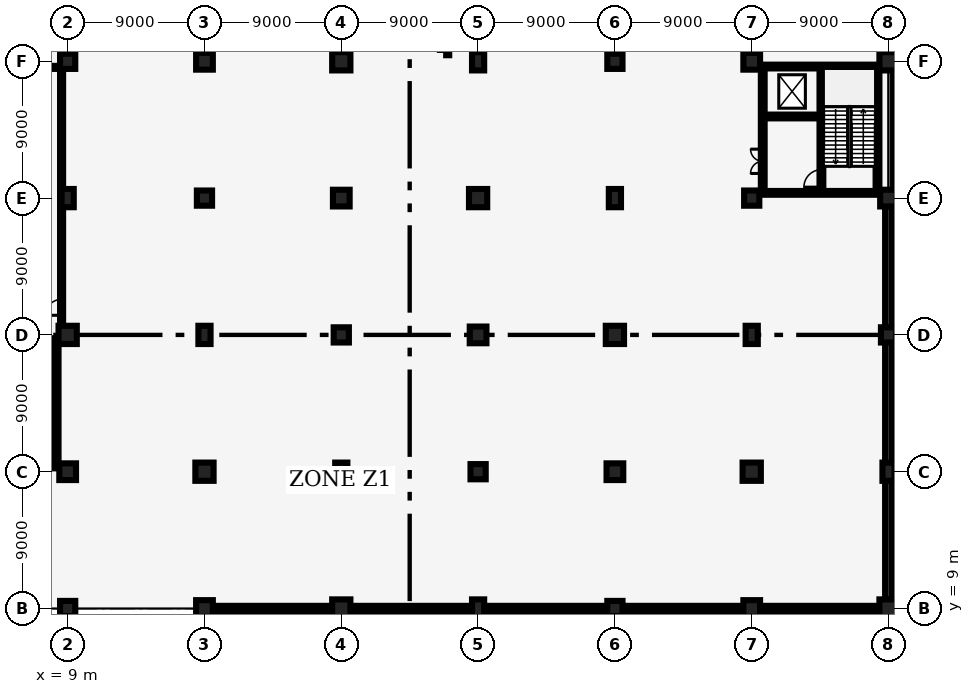
"""IFC4 building model, lengths in metres.
Left out: names, types, materials, properties, quantities, classifications, styles, units other than length and angle.
Written with IfcOpenShell. Run it as: python <this file> out.ifc"""

import sys

from ifc_helpers import new_model, si_unit, direction, frame, frame_2d, origin, origin_2d, place, context, subcontext, project, spatial, rectangle, extrude, element, fill, save


model = new_model("IFC4")
c1 = context("Model", 3, precision=1e-05, world=origin(), true_north=direction((0.0, 1.0)))
c2 = subcontext(c1, "Body", "Model", "MODEL_VIEW")
j1 = project(units=[si_unit("LENGTHUNIT", "METRE"), si_unit("PLANEANGLEUNIT", "RADIAN")], contexts=[c1])
p1 = place(None, origin())
s1 = spatial("IfcSite", under=j1, at=p1, CompositionType="ELEMENT")
p2 = place(p1, origin())
s2 = spatial("IfcBuilding", under=s1, at=p2, CompositionType="ELEMENT")
p3 = place(p2, frame((0.0, 0.0, -5.0)))
s3 = spatial("IfcBuildingStorey", under=s2, at=p3, CompositionType="ELEMENT", Elevation=-5.0)
p4 = place(p3, frame((9.0, 9.0, 0.0), z_axis=(0.0, 0.0, 1.0), x_axis=(1.0, 0.0, 0.0)))
e1 = element("IfcColumn", 1, at=p4, inside=s3, PredefinedType="COLUMN", context=c2, shape_type="SweptSolid", body=[
    extrude(rectangle(XDim=1.0, YDim=1.0, at=origin_2d()), origin(), (0.0, 0.0, 1.0), 5.0),
])
p5 = place(p3, frame((9.0, 18.0, 0.0), z_axis=(0.0, 0.0, 1.0), x_axis=(1.0, 0.0, 0.0)))
e2 = element("IfcColumn", 2, at=p5, inside=s3, PredefinedType="COLUMN", context=c2, shape_type="SweptSolid", body=[
    extrude(rectangle(XDim=1.1, YDim=1.1, at=origin_2d()), origin(), (0.0, 0.0, 1.0), 5.0),
])
p6 = place(p3, frame((9.0, 27.0, 0.0), z_axis=(0.0, 0.0, 1.0), x_axis=(1.0, 0.0, 0.0)))
e3 = element("IfcColumn", 3, at=p6, inside=s3, PredefinedType="COLUMN", context=c2, shape_type="SweptSolid", body=[
    extrude(rectangle(XDim=1.2, YDim=1.2, at=origin_2d()), origin(), (0.0, 0.0, 1.0), 5.0),
])
p7 = place(p3, frame((9.0, 36.0, 0.0), z_axis=(0.0, 0.0, 1.0), x_axis=(1.0, 0.0, 0.0)))
e4 = element("IfcColumn", 4, at=p7, inside=s3, PredefinedType="COLUMN", context=c2, shape_type="SweptSolid", body=[
    extrude(rectangle(XDim=0.8, YDim=1.2, at=origin_2d()), origin(), (0.0, 0.0, 1.0), 5.0),
])
p8 = place(p3, frame((9.0, 45.0, 0.0), z_axis=(0.0, 0.0, 1.0), x_axis=(1.0, 0.0, 0.0)))
e5 = element("IfcColumn", 5, at=p8, inside=s3, PredefinedType="COLUMN", context=c2, shape_type="SweptSolid", body=[
    extrude(rectangle(XDim=1.0, YDim=1.0, at=origin_2d()), origin(), (0.0, 0.0, 1.0), 5.0),
])
p9 = place(p3, frame((18.0, 9.0, 0.0), z_axis=(0.0, 0.0, 1.0), x_axis=(1.0, 0.0, 0.0)))
e6 = element("IfcColumn", 6, at=p9, inside=s3, PredefinedType="COLUMN", context=c2, shape_type="SweptSolid", body=[
    extrude(rectangle(XDim=1.1, YDim=1.1, at=origin_2d()), origin(), (0.0, 0.0, 1.0), 5.0),
])
p10 = place(p3, frame((18.0, 18.0, 0.0), z_axis=(0.0, 0.0, 1.0), x_axis=(1.0, 0.0, 0.0)))
e7 = element("IfcColumn", 7, at=p10, inside=s3, PredefinedType="COLUMN", context=c2, shape_type="SweptSolid", body=[
    extrude(rectangle(XDim=1.2, YDim=1.2, at=origin_2d()), origin(), (0.0, 0.0, 1.0), 5.0),
])
p11 = place(p3, frame((18.0, 27.0, 0.0), z_axis=(0.0, 0.0, 1.0), x_axis=(1.0, 0.0, 0.0)))
e8 = element("IfcColumn", 8, at=p11, inside=s3, PredefinedType="COLUMN", context=c2, shape_type="SweptSolid", body=[
    extrude(rectangle(XDim=0.8, YDim=1.2, at=origin_2d()), origin(), (0.0, 0.0, 1.0), 5.0),
])
p12 = place(p3, frame((18.0, 36.0, 0.0), z_axis=(0.0, 0.0, 1.0), x_axis=(1.0, 0.0, 0.0)))
e9 = element("IfcColumn", 9, at=p12, inside=s3, PredefinedType="COLUMN", context=c2, shape_type="SweptSolid", body=[
    extrude(rectangle(XDim=1.0, YDim=1.0, at=origin_2d()), origin(), (0.0, 0.0, 1.0), 5.0),
])
p13 = place(p3, frame((18.0, 45.0, 0.0), z_axis=(0.0, 0.0, 1.0), x_axis=(1.0, 0.0, 0.0)))
e10 = element("IfcColumn", 10, at=p13, inside=s3, PredefinedType="COLUMN", context=c2, shape_type="SweptSolid", body=[
    extrude(rectangle(XDim=1.1, YDim=1.1, at=origin_2d()), origin(), (0.0, 0.0, 1.0), 5.0),
])
p14 = place(p3, frame((27.0, 9.0, 0.0), z_axis=(0.0, 0.0, 1.0), x_axis=(1.0, 0.0, 0.0)))
e11 = element("IfcColumn", 11, at=p14, inside=s3, PredefinedType="COLUMN", context=c2, shape_type="SweptSolid", body=[
    extrude(rectangle(XDim=1.2, YDim=1.2, at=origin_2d()), origin(), (0.0, 0.0, 1.0), 5.0),
])
p15 = place(p3, frame((27.0, 18.0, 0.0), z_axis=(0.0, 0.0, 1.0), x_axis=(1.0, 0.0, 0.0)))
e12 = element("IfcColumn", 12, at=p15, inside=s3, PredefinedType="COLUMN", context=c2, shape_type="SweptSolid", body=[
    extrude(rectangle(XDim=0.8, YDim=1.2, at=origin_2d()), origin(), (0.0, 0.0, 1.0), 5.0),
])
p16 = place(p3, frame((27.0, 27.0, 0.0), z_axis=(0.0, 0.0, 1.0), x_axis=(1.0, 0.0, 0.0)))
e13 = element("IfcColumn", 13, at=p16, inside=s3, PredefinedType="COLUMN", context=c2, shape_type="SweptSolid", body=[
    extrude(rectangle(XDim=1.0, YDim=1.0, at=origin_2d()), origin(), (0.0, 0.0, 1.0), 4.66),
])
p17 = place(p3, frame((27.0, 36.0, 0.0), z_axis=(0.0, 0.0, 1.0), x_axis=(1.0, 0.0, 0.0)))
e14 = element("IfcColumn", 14, at=p17, inside=s3, PredefinedType="COLUMN", context=c2, shape_type="SweptSolid", body=[
    extrude(rectangle(XDim=1.1, YDim=1.1, at=origin_2d()), origin(), (0.0, 0.0, 1.0), 4.66),
])
p18 = place(p3, frame((27.0, 45.0, 0.0), z_axis=(0.0, 0.0, 1.0), x_axis=(1.0, 0.0, 0.0)))
e15 = element("IfcColumn", 15, at=p18, inside=s3, PredefinedType="COLUMN", context=c2, shape_type="SweptSolid", body=[
    extrude(rectangle(XDim=1.2, YDim=1.2, at=origin_2d()), origin(), (0.0, 0.0, 1.0), 5.0),
])
p19 = place(p3, frame((36.0, 9.0, 0.0), z_axis=(0.0, 0.0, 1.0), x_axis=(1.0, 0.0, 0.0)))
e16 = element("IfcColumn", 16, at=p19, inside=s3, PredefinedType="COLUMN", context=c2, shape_type="SweptSolid", body=[
    extrude(rectangle(XDim=0.8, YDim=1.2, at=origin_2d()), origin(), (0.0, 0.0, 1.0), 5.0),
])
p20 = place(p3, frame((36.0, 18.0, 0.0), z_axis=(0.0, 0.0, 1.0), x_axis=(1.0, 0.0, 0.0)))
e17 = element("IfcColumn", 17, at=p20, inside=s3, PredefinedType="COLUMN", context=c2, shape_type="SweptSolid", body=[
    extrude(rectangle(XDim=1.0, YDim=1.0, at=origin_2d()), origin(), (0.0, 0.0, 1.0), 5.0),
])
p21 = place(p3, frame((36.0, 27.0, 0.0), z_axis=(0.0, 0.0, 1.0), x_axis=(1.0, 0.0, 0.0)))
e18 = element("IfcColumn", 18, at=p21, inside=s3, PredefinedType="COLUMN", context=c2, shape_type="SweptSolid", body=[
    extrude(rectangle(XDim=1.1, YDim=1.1, at=origin_2d()), origin(), (0.0, 0.0, 1.0), 4.66),
])
p22 = place(p3, frame((36.0, 36.0, 0.0), z_axis=(0.0, 0.0, 1.0), x_axis=(1.0, 0.0, 0.0)))
e19 = element("IfcColumn", 19, at=p22, inside=s3, PredefinedType="COLUMN", context=c2, shape_type="SweptSolid", body=[
    extrude(rectangle(XDim=1.2, YDim=1.2, at=origin_2d()), origin(), (0.0, 0.0, 1.0), 4.66),
])
p23 = place(p3, frame((36.0, 45.0, 0.0), z_axis=(0.0, 0.0, 1.0), x_axis=(1.0, 0.0, 0.0)))
e20 = element("IfcColumn", 20, at=p23, inside=s3, PredefinedType="COLUMN", context=c2, shape_type="SweptSolid", body=[
    extrude(rectangle(XDim=0.8, YDim=1.2, at=origin_2d()), origin(), (0.0, 0.0, 1.0), 5.0),
])
p24 = place(p3, frame((45.0, 9.0, 0.0), z_axis=(0.0, 0.0, 1.0), x_axis=(1.0, 0.0, 0.0)))
e21 = element("IfcColumn", 21, at=p24, inside=s3, PredefinedType="COLUMN", context=c2, shape_type="SweptSolid", body=[
    extrude(rectangle(XDim=1.0, YDim=1.0, at=origin_2d()), origin(), (0.0, 0.0, 1.0), 5.0),
])
p25 = place(p3, frame((45.0, 18.0, 0.0), z_axis=(0.0, 0.0, 1.0), x_axis=(1.0, 0.0, 0.0)))
e22 = element("IfcColumn", 22, at=p25, inside=s3, PredefinedType="COLUMN", context=c2, shape_type="SweptSolid", body=[
    extrude(rectangle(XDim=1.1, YDim=1.1, at=origin_2d()), origin(), (0.0, 0.0, 1.0), 5.0),
])
p26 = place(p3, frame((45.0, 27.0, 0.0), z_axis=(0.0, 0.0, 1.0), x_axis=(1.0, 0.0, 0.0)))
e23 = element("IfcColumn", 23, at=p26, inside=s3, PredefinedType="COLUMN", context=c2, shape_type="SweptSolid", body=[
    extrude(rectangle(XDim=1.2, YDim=1.2, at=origin_2d()), origin(), (0.0, 0.0, 1.0), 4.66),
])
p27 = place(p3, frame((45.0, 36.0, 0.0), z_axis=(0.0, 0.0, 1.0), x_axis=(1.0, 0.0, 0.0)))
e24 = element("IfcColumn", 24, at=p27, inside=s3, PredefinedType="COLUMN", context=c2, shape_type="SweptSolid", body=[
    extrude(rectangle(XDim=0.8, YDim=1.2, at=origin_2d()), origin(), (0.0, 0.0, 1.0), 4.66),
])
p28 = place(p3, frame((45.0, 45.0, 0.0), z_axis=(0.0, 0.0, 1.0), x_axis=(1.0, 0.0, 0.0)))
e25 = element("IfcColumn", 25, at=p28, inside=s3, PredefinedType="COLUMN", context=c2, shape_type="SweptSolid", body=[
    extrude(rectangle(XDim=1.0, YDim=1.0, at=origin_2d()), origin(), (0.0, 0.0, 1.0), 5.0),
])
p29 = place(p3, frame((54.0, 9.0, 0.0), z_axis=(0.0, 0.0, 1.0), x_axis=(1.0, 0.0, 0.0)))
e26 = element("IfcColumn", 26, at=p29, inside=s3, PredefinedType="COLUMN", context=c2, shape_type="SweptSolid", body=[
    extrude(rectangle(XDim=1.1, YDim=1.1, at=origin_2d()), origin(), (0.0, 0.0, 1.0), 5.0),
])
p30 = place(p3, frame((54.0, 18.0, 0.0), z_axis=(0.0, 0.0, 1.0), x_axis=(1.0, 0.0, 0.0)))
e27 = element("IfcColumn", 27, at=p30, inside=s3, PredefinedType="COLUMN", context=c2, shape_type="SweptSolid", body=[
    extrude(rectangle(XDim=1.2, YDim=1.2, at=origin_2d()), origin(), (0.0, 0.0, 1.0), 5.0),
])
p31 = place(p3, frame((54.0, 27.0, 0.0), z_axis=(0.0, 0.0, 1.0), x_axis=(1.0, 0.0, 0.0)))
e28 = element("IfcColumn", 28, at=p31, inside=s3, PredefinedType="COLUMN", context=c2, shape_type="SweptSolid", body=[
    extrude(rectangle(XDim=0.8, YDim=1.2, at=origin_2d()), origin(), (0.0, 0.0, 1.0), 5.0),
])
p32 = place(p3, frame((54.0, 36.0, 0.0), z_axis=(0.0, 0.0, 1.0), x_axis=(1.0, 0.0, 0.0)))
e29 = element("IfcColumn", 29, at=p32, inside=s3, PredefinedType="COLUMN", context=c2, shape_type="SweptSolid", body=[
    extrude(rectangle(XDim=1.0, YDim=1.0, at=origin_2d()), origin(), (0.0, 0.0, 1.0), 5.0),
])
p33 = place(p3, frame((54.0, 45.0, 0.0), z_axis=(0.0, 0.0, 1.0), x_axis=(1.0, 0.0, 0.0)))
e30 = element("IfcColumn", 30, at=p33, inside=s3, PredefinedType="COLUMN", context=c2, shape_type="SweptSolid", body=[
    extrude(rectangle(XDim=1.1, YDim=1.1, at=origin_2d()), origin(), (0.0, 0.0, 1.0), 5.0),
])
p34 = place(p3, frame((63.0, 9.0, 0.0), z_axis=(0.0, 0.0, 1.0), x_axis=(1.0, 0.0, 0.0)))
e31 = element("IfcColumn", 31, at=p34, inside=s3, PredefinedType="COLUMN", context=c2, shape_type="SweptSolid", body=[
    extrude(rectangle(XDim=1.2, YDim=1.2, at=origin_2d()), origin(), (0.0, 0.0, 1.0), 5.0),
])
p35 = place(p3, frame((63.0, 18.0, 0.0), z_axis=(0.0, 0.0, 1.0), x_axis=(1.0, 0.0, 0.0)))
e32 = element("IfcColumn", 32, at=p35, inside=s3, PredefinedType="COLUMN", context=c2, shape_type="SweptSolid", body=[
    extrude(rectangle(XDim=0.8, YDim=1.2, at=origin_2d()), origin(), (0.0, 0.0, 1.0), 5.0),
])
p36 = place(p3, frame((63.0, 27.0, 0.0), z_axis=(0.0, 0.0, 1.0), x_axis=(1.0, 0.0, 0.0)))
e33 = element("IfcColumn", 33, at=p36, inside=s3, PredefinedType="COLUMN", context=c2, shape_type="SweptSolid", body=[
    extrude(rectangle(XDim=1.0, YDim=1.0, at=origin_2d()), origin(), (0.0, 0.0, 1.0), 5.0),
])
p37 = place(p3, frame((63.0, 36.0, 0.0), z_axis=(0.0, 0.0, 1.0), x_axis=(1.0, 0.0, 0.0)))
e34 = element("IfcColumn", 34, at=p37, inside=s3, PredefinedType="COLUMN", context=c2, shape_type="SweptSolid", body=[
    extrude(rectangle(XDim=1.1, YDim=1.1, at=origin_2d()), origin(), (0.0, 0.0, 1.0), 5.0),
])
p38 = place(p3, frame((63.0, 45.0, 0.0), z_axis=(0.0, 0.0, 1.0), x_axis=(1.0, 0.0, 0.0)))
e35 = element("IfcColumn", 35, at=p38, inside=s3, PredefinedType="COLUMN", context=c2, shape_type="SweptSolid", body=[
    extrude(rectangle(XDim=1.2, YDim=1.2, at=origin_2d()), origin(), (0.0, 0.0, 1.0), 5.0),
])
p39 = place(p3, frame((18.545, 9.0, 0.0), z_axis=(0.0, 0.0, 1.0), x_axis=(1.0, 0.0, 0.0)))
e36 = element("IfcWall", 36, at=p39, inside=s3, PredefinedType="SHEAR", context=c2, shape_type="SweptSolid", body=[
    extrude(rectangle(XDim=43.86, YDim=0.35, at=frame_2d((21.93, 0.0))), origin(), (0.0, 0.0, 1.0), 3.95),
])
p40 = place(p3, frame((63.0, 9.595, 0.0), z_axis=(0.0, 0.0, 1.0), x_axis=(0.0, 1.0, 0.0)))
e37 = element("IfcWall", 37, at=p40, inside=s3, PredefinedType="SHEAR", context=c2, shape_type="SweptSolid", body=[
    extrude(rectangle(XDim=25.86, YDim=0.45, at=frame_2d((12.93, 0.0))), origin(), (0.0, 0.0, 1.0), 3.95),
])
p41 = place(p3, frame((8.275, 18.47, 0.0), z_axis=(0.0, 0.0, 1.0), x_axis=(0.0, 1.0, 0.0)))
e38 = element("IfcWall", 38, at=p41, inside=s3, PredefinedType="SHEAR", context=c2, shape_type="SweptSolid", body=[
    extrude(rectangle(XDim=8.06, YDim=0.25, at=frame_2d((4.03, 0.0))), origin(), (0.0, 0.0, 1.0), 4.66),
])
p42 = place(p41, frame((1.15, 0.0, 0.0)))
e39 = element("IfcOpeningElement", 39, at=p42, cuts=e38, PredefinedType="OPENING", context=c2, shape_type="SweptSolid", body=[
    extrude(rectangle(XDim=1.6, YDim=2.2, at=frame_2d((0.8, 1.1))), frame((0.0, 0.135, 0.0), z_axis=(0.0, -1.0, 0.0), x_axis=(1.0, 0.0, 0.0)), (0.0, 0.0, 1.0), 0.27),
])
for number, where, z_axis, x_axis in (
    (40, (0.6, 18.345, 0.0), (0.0, 0.0, 1.0), (1.0, 0.0, 0.0)),
    (41, (0.6, 26.655, 0.0), (0.0, 0.0, 1.0), (1.0, 0.0, 0.0)),
):
    element("IfcWall", number, at=place(p3, frame(where, z_axis=z_axis, x_axis=x_axis)), inside=s3, PredefinedType="SHEAR", context=c2, shape_type="SweptSolid", body=[
        extrude(rectangle(XDim=7.8, YDim=0.25, at=frame_2d((3.9, 0.0))), origin(), (0.0, 0.0, 1.0), 4.66),
    ])
p43 = place(p3, frame((4.54, 23.37, 0.0), z_axis=(0.0, 0.0, 1.0), x_axis=(1.0, 0.0, 0.0)))
e42 = element("IfcWall", 42, at=p43, inside=s3, PredefinedType="SHEAR", context=c2, shape_type="SweptSolid", body=[
    extrude(rectangle(XDim=3.61, YDim=0.25, at=frame_2d((1.805, 0.0))), origin(), (0.0, 0.0, 1.0), 4.66),
])
p44 = place(p43, frame((0.5, 0.0, 0.0)))
e43 = element("IfcOpeningElement", 43, at=p44, cuts=e42, PredefinedType="OPENING", context=c2, shape_type="SweptSolid", body=[
    extrude(rectangle(XDim=2.2, YDim=2.4, at=frame_2d((1.1, 1.2))), frame((0.0, 0.135, 0.0), z_axis=(0.0, -1.0, 0.0), x_axis=(1.0, 0.0, 0.0)), (0.0, 0.0, 1.0), 0.27),
])
p45 = place(p3, frame((54.725, 36.47, 0.0), z_axis=(0.0, 0.0, 1.0), x_axis=(0.0, 1.0, 0.0)))
e44 = element("IfcWall", 44, at=p45, inside=s3, PredefinedType="SHEAR", context=c2, shape_type="SweptSolid", body=[
    extrude(rectangle(XDim=8.06, YDim=0.25, at=frame_2d((4.03, 0.0))), origin(), (0.0, 0.0, 1.0), 4.66),
])
p46 = place(p45, frame((1.15, 0.0, 0.0)))
e45 = element("IfcOpeningElement", 45, at=p46, cuts=e44, PredefinedType="OPENING", context=c2, shape_type="SweptSolid", body=[
    extrude(rectangle(XDim=1.6, YDim=2.2, at=frame_2d((0.8, 1.1))), frame((0.0, 0.135, 0.0), z_axis=(0.0, -1.0, 0.0), x_axis=(1.0, 0.0, 0.0)), (0.0, 0.0, 1.0), 0.27),
])
p47 = place(p3, frame((62.275, 36.47, 0.0), z_axis=(0.0, 0.0, 1.0), x_axis=(0.0, 1.0, 0.0)))
e46 = element("IfcWall", 46, at=p47, inside=s3, PredefinedType="SHEAR", context=c2, shape_type="SweptSolid", body=[
    extrude(rectangle(XDim=8.06, YDim=0.25, at=frame_2d((4.03, 0.0))), origin(), (0.0, 0.0, 1.0), 4.66),
])
for number, where, z_axis, x_axis in (
    (47, (54.6, 36.345, 0.0), (0.0, 0.0, 1.0), (1.0, 0.0, 0.0)),
    (48, (54.6, 44.655, 0.0), (0.0, 0.0, 1.0), (1.0, 0.0, 0.0)),
):
    element("IfcWall", number, at=place(p3, frame(where, z_axis=z_axis, x_axis=x_axis)), inside=s3, PredefinedType="SHEAR", context=c2, shape_type="SweptSolid", body=[
        extrude(rectangle(XDim=7.8, YDim=0.25, at=frame_2d((3.9, 0.0))), origin(), (0.0, 0.0, 1.0), 4.66),
    ])
p48 = place(p3, frame((58.585, 36.47, 0.0), z_axis=(0.0, 0.0, 1.0), x_axis=(0.0, 1.0, 0.0)))
e49 = element("IfcWall", 49, at=p48, inside=s3, PredefinedType="SHEAR", context=c2, shape_type="SweptSolid", body=[
    extrude(rectangle(XDim=8.06, YDim=0.25, at=frame_2d((4.03, 0.0))), origin(), (0.0, 0.0, 1.0), 4.66),
])
p49 = place(p48, frame((0.25, 0.0, 0.0)))
e50 = element("IfcOpeningElement", 50, at=p49, cuts=e49, PredefinedType="OPENING", context=c2, shape_type="SweptSolid", body=[
    extrude(rectangle(XDim=1.15, YDim=2.15, at=frame_2d((0.575, 1.075))), frame((0.0, 0.135, 0.0), z_axis=(0.0, -1.0, 0.0), x_axis=(1.0, 0.0, 0.0)), (0.0, 0.0, 1.0), 0.27),
])
p50 = place(p3, frame((54.85, 41.37, 0.0), z_axis=(0.0, 0.0, 1.0), x_axis=(1.0, 0.0, 0.0)))
e51 = element("IfcWall", 51, at=p50, inside=s3, PredefinedType="SHEAR", context=c2, shape_type="SweptSolid", body=[
    extrude(rectangle(XDim=3.61, YDim=0.25, at=frame_2d((1.805, 0.0))), origin(), (0.0, 0.0, 1.0), 4.66),
])
p51 = place(p50, frame((0.95, 0.0, 0.0)))
e52 = element("IfcOpeningElement", 52, at=p51, cuts=e51, PredefinedType="OPENING", context=c2, shape_type="SweptSolid", body=[
    extrude(rectangle(XDim=1.2, YDim=2.2, at=frame_2d((0.6, 1.1))), frame((0.0, 0.135, 0.0), z_axis=(0.0, -1.0, 0.0), x_axis=(1.0, 0.0, 0.0)), (0.0, 0.0, 1.0), 0.27),
])
p52 = place(p3, frame((8.6, 27.14, 0.0), z_axis=(0.0, 0.0, 1.0), x_axis=(0.0, 1.0, 0.0)))
e53 = element("IfcWall", 53, at=p52, inside=s3, PredefinedType="SOLIDWALL", context=c2, shape_type="SweptSolid", body=[
    extrude(rectangle(XDim=17.46, YDim=0.2, at=frame_2d((8.73, 0.0))), origin(), (0.0, 0.0, 1.0), 3.85),
])
p53 = place(p52, frame((1.15, 0.0, 0.0)))
e54 = element("IfcOpeningElement", 54, at=p53, cuts=e53, PredefinedType="OPENING", context=c2, shape_type="SweptSolid", body=[
    extrude(rectangle(XDim=1.05, YDim=2.15, at=frame_2d((0.525, 1.075))), frame((0.0, 0.11, 0.0), z_axis=(0.0, -1.0, 0.0), x_axis=(1.0, 0.0, 0.0)), (0.0, 0.0, 1.0), 0.22),
])
p54 = place(p3, frame((0.72, 44.6, 0.0), z_axis=(0.0, 0.0, 1.0), x_axis=(1.0, 0.0, 0.0)))
e55 = element("IfcWall", 55, at=p54, inside=s3, PredefinedType="SOLIDWALL", context=c2, shape_type="SweptSolid", body=[
    extrude(rectangle(XDim=7.76, YDim=0.2, at=frame_2d((3.88, 0.0))), origin(), (0.0, 0.0, 1.0), 3.85),
])
p55 = place(p3, frame((63.4, 36.72, 0.0), z_axis=(0.0, 0.0, 1.0), x_axis=(0.0, 1.0, 0.0)))
e56 = element("IfcWall", 56, at=p55, inside=s3, PredefinedType="SOLIDWALL", context=c2, shape_type="SweptSolid", body=[
    extrude(rectangle(XDim=7.96, YDim=0.2, at=frame_2d((3.98, 0.0))), origin(), (0.0, 0.0, 1.0), 3.85),
])
p56 = place(p3, frame((34.0, 45.4, 0.0), z_axis=(0.0, 0.0, 1.0), x_axis=(0.0, 1.0, 0.0)))
e57 = element("IfcWall", 57, at=p56, inside=s3, PredefinedType="SOLIDWALL", context=c2, shape_type="SweptSolid", body=[
    extrude(rectangle(XDim=8.0, YDim=0.2, at=frame_2d((4.0, 0.0))), origin(), (0.0, 0.0, 1.0), 3.85),
])
p57 = place(p56, frame((0.25, 0.0, 0.0)))
e58 = element("IfcOpeningElement", 58, at=p57, cuts=e57, PredefinedType="OPENING", context=c2, shape_type="SweptSolid", body=[
    extrude(rectangle(XDim=1.4, YDim=2.25, at=frame_2d((0.7, 1.125))), frame((0.0, 0.11, 0.0), z_axis=(0.0, -1.0, 0.0), x_axis=(1.0, 0.0, 0.0)), (0.0, 0.0, 1.0), 0.22),
])
p58 = place(p42, origin())
e59 = element("IfcDoor", 59, at=p58, inside=s3, OperationType="DOUBLE_DOOR_SINGLE_SWING", PredefinedType="DOOR", context=c2, shape_type="SweptSolid", body=[
    extrude(rectangle(XDim=1.6, YDim=2.2, at=frame_2d((0.8, 1.1))), frame((0.0, 0.025, 0.0), z_axis=(0.0, -1.0, 0.0), x_axis=(1.0, 0.0, 0.0)), (0.0, 0.0, 1.0), 0.05),
])
fill(e39, e59)
p59 = place(p49, origin())
e60 = element("IfcDoor", 60, at=p59, inside=s3, OperationType="SINGLE_SWING_LEFT", PredefinedType="DOOR", context=c2, shape_type="SweptSolid", body=[
    extrude(rectangle(XDim=1.15, YDim=2.15, at=frame_2d((0.575, 1.075))), frame((0.0, 0.025, 0.0), z_axis=(0.0, -1.0, 0.0), x_axis=(1.0, 0.0, 0.0)), (0.0, 0.0, 1.0), 0.05),
])
fill(e50, e60)
p60 = place(p51, origin())
e61 = element("IfcDoor", 61, at=p60, inside=s3, OperationType="DOUBLE_DOOR_SLIDING", PredefinedType="DOOR", context=c2, shape_type="SweptSolid", body=[
    extrude(rectangle(XDim=1.2, YDim=2.2, at=frame_2d((0.6, 1.1))), frame((0.0, 0.025, 0.0), z_axis=(0.0, -1.0, 0.0), x_axis=(1.0, 0.0, 0.0)), (0.0, 0.0, 1.0), 0.05),
])
fill(e52, e61)
p61 = place(p46, origin())
e62 = element("IfcDoor", 62, at=p61, inside=s3, OperationType="DOUBLE_DOOR_SINGLE_SWING", PredefinedType="DOOR", context=c2, shape_type="SweptSolid", body=[
    extrude(rectangle(XDim=1.6, YDim=2.2, at=frame_2d((0.8, 1.1))), frame((0.0, 0.025, 0.0), z_axis=(0.0, -1.0, 0.0), x_axis=(1.0, 0.0, 0.0)), (0.0, 0.0, 1.0), 0.05),
])
fill(e45, e62)
p62 = place(p53, origin())
e63 = element("IfcDoor", 63, at=p62, inside=s3, OperationType="SINGLE_SWING_LEFT", PredefinedType="DOOR", context=c2, shape_type="SweptSolid", body=[
    extrude(rectangle(XDim=1.05, YDim=2.15, at=frame_2d((0.525, 1.075))), frame((0.0, 0.025, 0.0), z_axis=(0.0, -1.0, 0.0), x_axis=(1.0, 0.0, 0.0)), (0.0, 0.0, 1.0), 0.05),
])
fill(e54, e63)
save(model, sys.argv[1])
